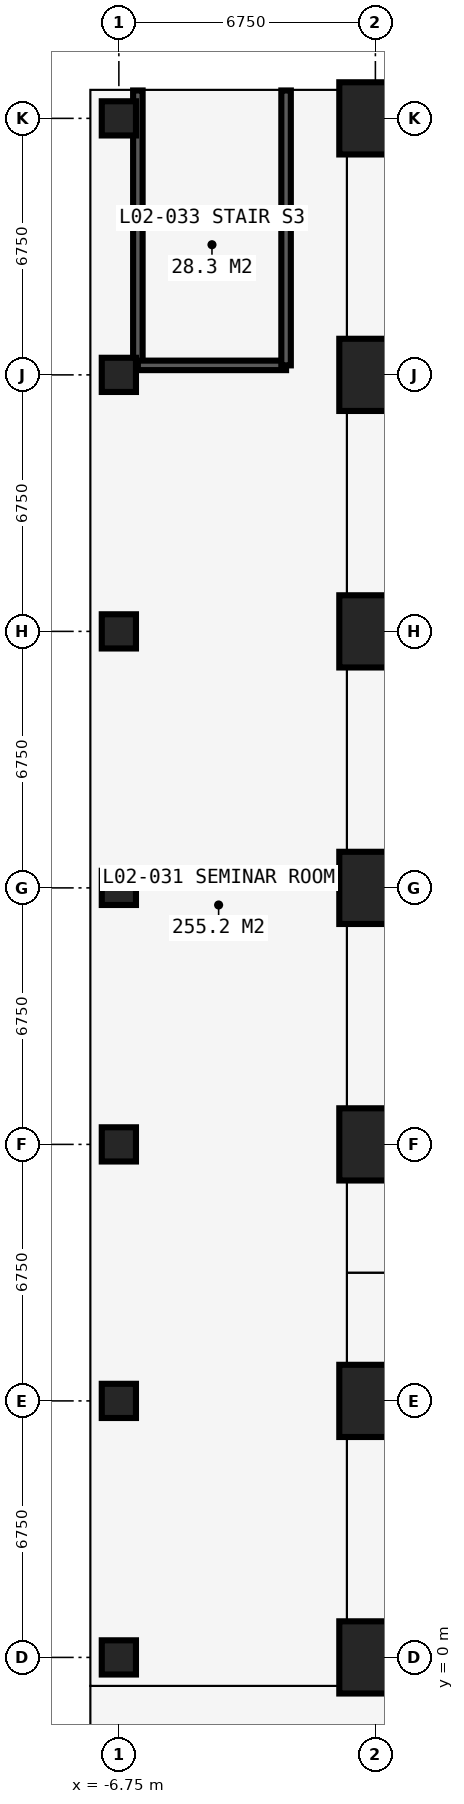
"""IFC4 building model, lengths in metres.
Left out: names, types, materials, properties, quantities, classifications, styles, units other than length and angle.
Written with IfcOpenShell. Run it as: python <this file> out.ifc"""

import sys

from ifc_helpers import new_model, si_unit, direction, frame, frame_2d, origin, origin_2d, place, context, subcontext, project, spatial, rectangle, circle, extrude, element, fill, save


model = new_model("IFC4")
c1 = context("Model", 3, precision=1e-05, world=origin(), true_north=direction((0.0, 1.0)))
c2 = subcontext(c1, "Body", "Model", "MODEL_VIEW")
j1 = project(units=[si_unit("LENGTHUNIT", "METRE"), si_unit("PLANEANGLEUNIT", "RADIAN")], contexts=[c1])
p1 = place(None, origin())
s1 = spatial("IfcSite", under=j1, at=p1, CompositionType="ELEMENT")
p2 = place(p1, origin())
s2 = spatial("IfcBuilding", under=s1, at=p2, CompositionType="ELEMENT")
p3 = place(p2, frame((0.0, 0.0, 9.0)))
s3 = spatial("IfcBuildingStorey", under=s2, at=p3, CompositionType="ELEMENT", Elevation=9.0)
for number, where, z_axis, x_axis in (
    (1, (-6.75, 0.0, 0.0), (0.0, 0.0, 1.0), (1.0, 0.0, 0.0)),
    (2, (-6.75, 6.75, 0.0), (0.0, 0.0, 1.0), (1.0, 0.0, 0.0)),
    (3, (-6.75, 13.5, 0.0), (0.0, 0.0, 1.0), (1.0, 0.0, 0.0)),
    (4, (-6.75, 20.25, 0.0), (0.0, 0.0, 1.0), (1.0, 0.0, 0.0)),
    (5, (-6.75, 27.0, 0.0), (0.0, 0.0, 1.0), (1.0, 0.0, 0.0)),
    (6, (-6.75, 33.75, 0.0), (0.0, 0.0, 1.0), (1.0, 0.0, 0.0)),
    (7, (-6.75, 40.5, 0.0), (0.0, 0.0, 1.0), (1.0, 0.0, 0.0)),
):
    element("IfcColumn", number, at=place(p3, frame(where, z_axis=z_axis, x_axis=x_axis)), inside=s3, PredefinedType="COLUMN", context=c2, shape_type="SweptSolid", body=[
        extrude(circle(Radius=0.45, at=origin_2d()), origin(), (0.0, 0.0, 1.0), 4.5),
    ])
for number, where, z_axis, x_axis in (
    (8, (0.0, 0.0, 0.0), (0.0, 0.0, 1.0), (1.0, 0.0, 0.0)),
    (9, (0.0, 6.75, 0.0), (0.0, 0.0, 1.0), (1.0, 0.0, 0.0)),
    (10, (0.0, 13.5, 0.0), (0.0, 0.0, 1.0), (1.0, 0.0, 0.0)),
    (11, (0.0, 20.25, 0.0), (0.0, 0.0, 1.0), (1.0, 0.0, 0.0)),
    (12, (0.0, 27.0, 0.0), (0.0, 0.0, 1.0), (1.0, 0.0, 0.0)),
    (13, (0.0, 33.75, 0.0), (0.0, 0.0, 1.0), (1.0, 0.0, 0.0)),
    (14, (0.0, 40.5, 0.0), (0.0, 0.0, 1.0), (1.0, 0.0, 0.0)),
):
    element("IfcColumn", number, at=place(p3, frame(where, z_axis=z_axis, x_axis=x_axis)), inside=s3, PredefinedType="COLUMN", context=c2, shape_type="SweptSolid", body=[
        extrude(rectangle(XDim=1.9, YDim=1.9, at=origin_2d()), origin(), (0.0, 0.0, 1.0), 4.5),
    ])
p4 = place(p3, frame((-7.484, -0.75, 0.0), z_axis=(0.0, 0.0, 1.0), x_axis=(1.0, 0.0, 0.0)))
e15 = element("IfcWall", 15, at=p4, inside=s3, PredefinedType="PARTITIONING", context=c2, shape_type="SweptSolid", body=[
    extrude(rectangle(XDim=50.334, YDim=0.15, at=frame_2d((25.167, 0.0))), origin(), (0.0, 0.0, 1.0), 4.25),
])
p5 = place(p4, frame((21.934, 0.0, 0.0)))
e16 = element("IfcOpeningElement", 16, at=p5, cuts=e15, PredefinedType="OPENING", context=c2, shape_type="SweptSolid", body=[
    extrude(rectangle(XDim=1.6, YDim=2.4, at=frame_2d((0.8, 1.2))), frame((0.0, 0.085, 0.0), z_axis=(0.0, -1.0, 0.0), x_axis=(1.0, 0.0, 0.0)), (0.0, 0.0, 1.0), 0.17),
])
p6 = place(p3, frame((-6.25, 34.0, 0.0), z_axis=(0.0, 0.0, 1.0), x_axis=(0.0, 1.0, 0.0)))
e17 = element("IfcWall", 17, at=p6, inside=s3, PredefinedType="SOLIDWALL", context=c2, shape_type="SweptSolid", body=[
    extrude(rectangle(XDim=7.234, YDim=0.25, at=frame_2d((3.617, 0.0))), origin(), (0.0, 0.0, 1.0), 4.25),
])
p7 = place(p3, frame((-6.25, 34.0, 0.0), z_axis=(0.0, 0.0, 1.0), x_axis=(1.0, 0.0, 0.0)))
e18 = element("IfcWall", 18, at=p7, inside=s3, PredefinedType="SOLIDWALL", context=c2, shape_type="SweptSolid", body=[
    extrude(rectangle(XDim=3.9, YDim=0.25, at=frame_2d((1.95, 0.0))), origin(), (0.0, 0.0, 1.0), 4.25),
])
p8 = place(p7, frame((1.35, 0.0, 0.0)))
e19 = element("IfcOpeningElement", 19, at=p8, cuts=e18, PredefinedType="OPENING", context=c2, shape_type="SweptSolid", body=[
    extrude(rectangle(XDim=1.2, YDim=2.2, at=frame_2d((0.6, 1.1))), frame((0.0, 0.135, 0.0), z_axis=(0.0, -1.0, 0.0), x_axis=(1.0, 0.0, 0.0)), (0.0, 0.0, 1.0), 0.27),
])
p9 = place(p3, frame((-2.35, 34.0, 0.0), z_axis=(0.0, 0.0, 1.0), x_axis=(0.0, 1.0, 0.0)))
e20 = element("IfcWall", 20, at=p9, inside=s3, PredefinedType="SOLIDWALL", context=c2, shape_type="SweptSolid", body=[
    extrude(rectangle(XDim=7.234, YDim=0.25, at=frame_2d((3.617, 0.0))), origin(), (0.0, 0.0, 1.0), 4.25),
])
p10 = place(p3, frame((-0.75, -0.75, 0.0), z_axis=(0.0, 0.0, 1.0), x_axis=(0.0, 1.0, 0.0)))
e21 = element("IfcWall", 21, at=p10, inside=s3, PredefinedType="PARTITIONING", context=c2, shape_type="SweptSolid", body=[
    extrude(rectangle(XDim=41.984, YDim=0.15, at=frame_2d((20.992, 0.0))), origin(), (0.0, 0.0, 1.0), 4.25),
])
p11 = place(p10, frame((4.65, 0.0, 0.0)))
e22 = element("IfcOpeningElement", 22, at=p11, cuts=e21, PredefinedType="OPENING", context=c2, shape_type="SweptSolid", body=[
    extrude(rectangle(XDim=1.6, YDim=2.4, at=frame_2d((0.8, 1.2))), frame((0.0, 0.085, 0.0), z_axis=(0.0, -1.0, 0.0), x_axis=(1.0, 0.0, 0.0)), (0.0, 0.0, 1.0), 0.17),
])
p12 = place(p3, frame((-0.75, 10.125, 0.0), z_axis=(0.0, 0.0, 1.0), x_axis=(1.0, 0.0, 0.0)))
e23 = element("IfcWall", 23, at=p12, inside=s3, PredefinedType="PARTITIONING", context=c2, shape_type="SweptSolid", body=[
    extrude(rectangle(XDim=10.875, YDim=0.15, at=frame_2d((5.438, 0.0))), origin(), (0.0, 0.0, 1.0), 4.25),
])
p13 = place(p11, origin())
e24 = element("IfcDoor", 24, at=p13, inside=s3, OperationType="DOUBLE_DOOR_SINGLE_SWING", PredefinedType="DOOR", context=c2, shape_type="SweptSolid", body=[
    extrude(rectangle(XDim=1.6, YDim=2.4, at=frame_2d((0.8, 1.2))), frame((0.0, 0.025, 0.0), z_axis=(0.0, -1.0, 0.0), x_axis=(1.0, 0.0, 0.0)), (0.0, 0.0, 1.0), 0.05),
])
fill(e22, e24)
p14 = place(p8, origin())
e25 = element("IfcDoor", 25, at=p14, inside=s3, OperationType="SINGLE_SWING_LEFT", PredefinedType="DOOR", context=c2, shape_type="SweptSolid", body=[
    extrude(rectangle(XDim=1.2, YDim=2.2, at=frame_2d((0.6, 1.1))), frame((0.0, 0.025, 0.0), z_axis=(0.0, -1.0, 0.0), x_axis=(1.0, 0.0, 0.0)), (0.0, 0.0, 1.0), 0.05),
])
fill(e19, e25)
save(model, sys.argv[1])
